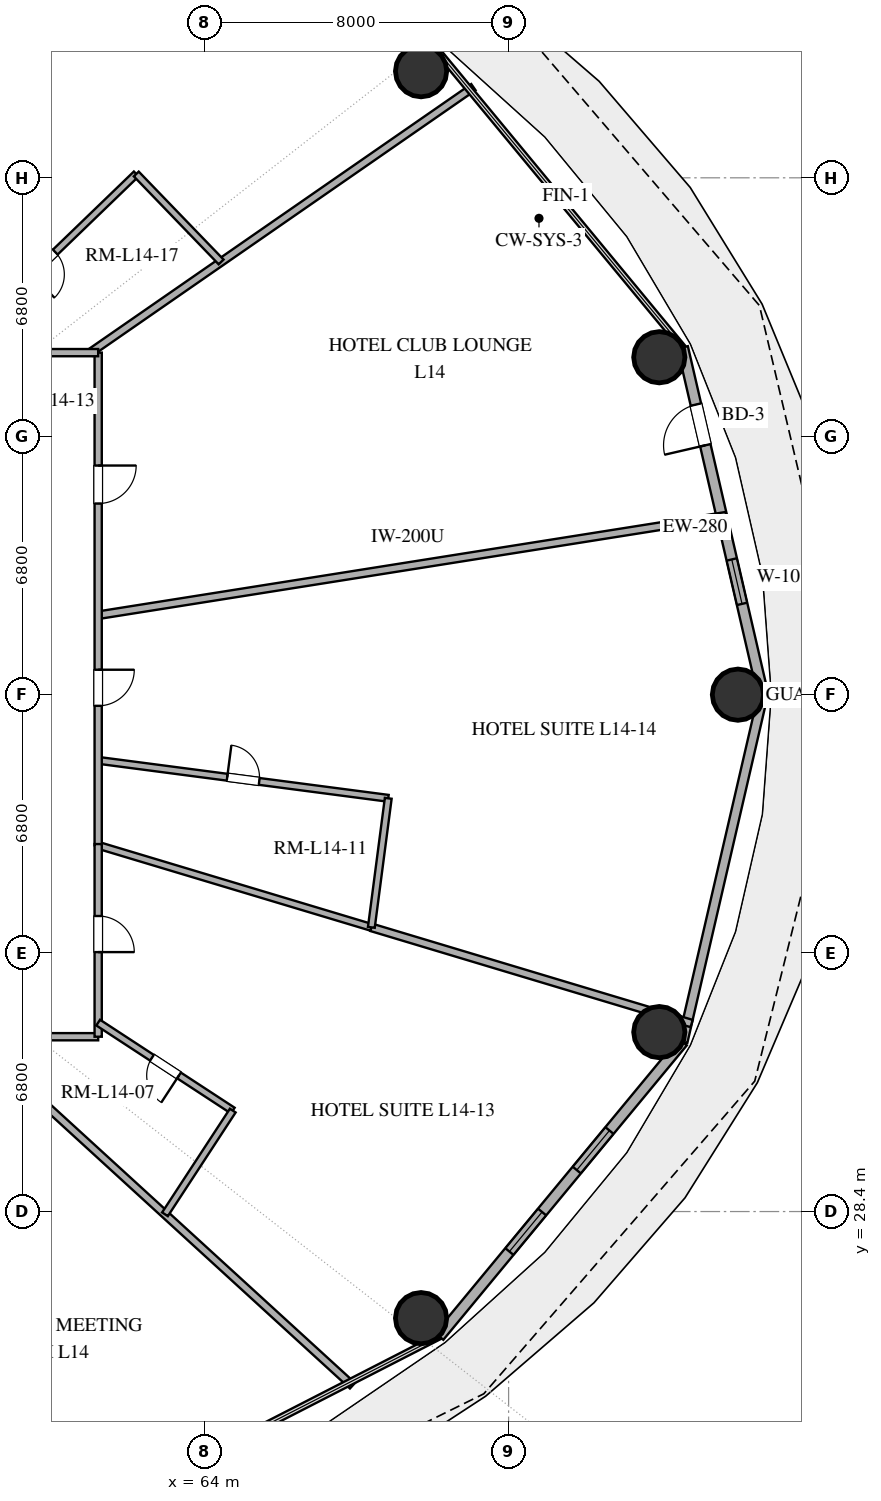
"""IFC4 building model, lengths in metres.
Left out: names, types, materials, properties, quantities, classifications, styles, units other than length and angle.
Written with IfcOpenShell. Run it as: python <this file> out.ifc"""

import sys

from ifc_helpers import new_model, si_unit, direction, frame, frame_2d, origin, origin_2d, place, context, subcontext, project, spatial, rectangle, hollow_circle, extrude, element, fill, save


model = new_model("IFC4")
c1 = context("Model", 3, precision=1e-05, world=origin(), true_north=direction((0.0, 1.0)))
c2 = subcontext(c1, "Body", "Model", "MODEL_VIEW")
j1 = project(units=[si_unit("LENGTHUNIT", "METRE"), si_unit("PLANEANGLEUNIT", "RADIAN")], contexts=[c1])
p1 = place(None, origin())
s1 = spatial("IfcSite", under=j1, at=p1, CompositionType="ELEMENT")
p2 = place(p1, origin())
s2 = spatial("IfcBuilding", under=s1, at=p2, CompositionType="ELEMENT")
p3 = place(p2, frame((0.0, 0.0, 60.6)))
s3 = spatial("IfcBuildingStorey", under=s2, at=p3, CompositionType="ELEMENT", Elevation=60.6)
for number, where, z_axis, x_axis in (
    (1, (78.035, 42.0, 0.0), (0.0, 0.0, 1.0), (1.0, 0.0, 0.0)),
    (2, (75.966, 50.878, 0.0), (0.0, 0.0, 1.0), (1.0, 0.0, 0.0)),
    (3, (69.697, 58.405, 0.0), (0.0, 0.0, 1.0), (1.0, 0.0, 0.0)),
    (4, (69.697, 25.595, 0.0), (0.0, 0.0, 1.0), (1.0, 0.0, 0.0)),
    (5, (75.966, 33.122, 0.0), (0.0, 0.0, 1.0), (1.0, 0.0, 0.0)),
):
    element("IfcColumn", number, at=place(p3, frame(where, z_axis=z_axis, x_axis=x_axis)), inside=s3, PredefinedType="COLUMN", context=c2, shape_type="SweptSolid", body=[
        extrude(hollow_circle(Radius=0.675, WallThickness=0.036, at=origin_2d()), origin(), (0.0, 0.0, 1.0), 3.38),
    ])
p4 = place(p3, frame((78.696, 42.0, 0.0), z_axis=(0.0, 0.0, 1.0), x_axis=(-0.225454452941, 0.974253709076, 0.0)))
e6 = element("IfcWall", 6, at=p4, inside=s3, PredefinedType="SOLIDWALL", context=c2, shape_type="SweptSolid", body=[
    extrude(rectangle(XDim=9.38, YDim=0.28, at=frame_2d((4.69, 0.0))), origin(), (0.0, 0.0, 1.0), 3.38),
])
p5 = place(p4, frame((2.452, 0.0, 0.85)))
e7 = element("IfcOpeningElement", 7, at=p5, cuts=e6, PredefinedType="OPENING", context=c2, shape_type="SweptSolid", body=[
    extrude(rectangle(XDim=1.2, YDim=1.6, at=frame_2d((0.6, 0.8))), frame((0.0, 0.15, 0.0), z_axis=(0.0, -1.0, 0.0), x_axis=(1.0, 0.0, 0.0)), (0.0, 0.0, 1.0), 0.3),
])
p6 = place(p4, frame((6.735, 0.0, 0.0)))
e8 = element("IfcOpeningElement", 8, at=p6, cuts=e6, PredefinedType="OPENING", context=c2, shape_type="SweptSolid", body=[
    extrude(rectangle(XDim=1.1, YDim=2.25, at=frame_2d((0.55, 1.125))), frame((0.0, 0.15, 0.0), z_axis=(0.0, -1.0, 0.0), x_axis=(1.0, 0.0, 0.0)), (0.0, 0.0, 1.0), 0.3),
])
p7 = place(p3, frame((70.174, 58.886, 0.0), z_axis=(0.0, 0.0, 1.0), x_axis=(-0.889853976658, 0.456245438581, 0.0)))
e9 = element("IfcWall", 9, at=p7, inside=s3, PredefinedType="SOLIDWALL", context=c2, shape_type="SweptSolid", body=[
    extrude(rectangle(XDim=11.346, YDim=0.28, at=frame_2d((5.673, 0.0))), origin(), (0.0, 0.0, 1.0), 3.38),
])
p8 = place(p7, frame((3.167, 0.0, 0.85)))
e10 = element("IfcOpeningElement", 10, at=p8, cuts=e9, PredefinedType="OPENING", context=c2, shape_type="SweptSolid", body=[
    extrude(rectangle(XDim=1.8, YDim=2.2, at=frame_2d((0.9, 1.1))), frame((0.0, 0.15, 0.0), z_axis=(0.0, -1.0, 0.0), x_axis=(1.0, 0.0, 0.0)), (0.0, 0.0, 1.0), 0.3),
])
p9 = place(p7, frame((6.529, 0.0, 0.85)))
e11 = element("IfcOpeningElement", 11, at=p9, cuts=e9, PredefinedType="OPENING", context=c2, shape_type="SweptSolid", body=[
    extrude(rectangle(XDim=1.8, YDim=2.2, at=frame_2d((0.9, 1.1))), frame((0.0, 0.15, 0.0), z_axis=(0.0, -1.0, 0.0), x_axis=(1.0, 0.0, 0.0)), (0.0, 0.0, 1.0), 0.3),
])
p10 = place(p3, frame((70.174, 25.114, 0.0), z_axis=(0.0, 0.0, 1.0), x_axis=(0.637296809613, 0.770618437657, 0.0)))
e12 = element("IfcWall", 12, at=p10, inside=s3, PredefinedType="SOLIDWALL", context=c2, shape_type="SweptSolid", body=[
    extrude(rectangle(XDim=10.053, YDim=0.28, at=frame_2d((5.027, 0.0))), origin(), (0.0, 0.0, 1.0), 3.38),
])
p11 = place(p10, frame((2.898, 0.0, 0.85)))
e13 = element("IfcOpeningElement", 13, at=p11, cuts=e12, PredefinedType="OPENING", context=c2, shape_type="SweptSolid", body=[
    extrude(rectangle(XDim=1.35, YDim=1.8, at=frame_2d((0.675, 0.9))), frame((0.0, 0.15, 0.0), z_axis=(0.0, -1.0, 0.0), x_axis=(1.0, 0.0, 0.0)), (0.0, 0.0, 1.0), 0.3),
])
p12 = place(p10, frame((5.68, 0.0, 0.85)))
e14 = element("IfcOpeningElement", 14, at=p12, cuts=e12, PredefinedType="OPENING", context=c2, shape_type="SweptSolid", body=[
    extrude(rectangle(XDim=1.35, YDim=1.8, at=frame_2d((0.675, 0.9))), frame((0.0, 0.15, 0.0), z_axis=(0.0, -1.0, 0.0), x_axis=(1.0, 0.0, 0.0)), (0.0, 0.0, 1.0), 0.3),
])
p13 = place(p3, frame((76.581, 32.862, 0.0), z_axis=(0.0, 0.0, 1.0), x_axis=(0.225454452941, 0.974253709076, 0.0)))
e15 = element("IfcWall", 15, at=p13, inside=s3, PredefinedType="SOLIDWALL", context=c2, shape_type="SweptSolid", body=[
    extrude(rectangle(XDim=9.38, YDim=0.25, at=frame_2d((4.69, 0.0))), origin(), (0.0, 0.0, 1.0), 3.38),
])
p14 = place(p3, frame((61.2, 44.091, 0.0), z_axis=(0.0, 0.0, 1.0), x_axis=(0.987690823911, 0.156418785194, 0.0)))
e16 = element("IfcWall", 16, at=p14, inside=s3, PredefinedType="PARTITIONING", context=c2, shape_type="SweptSolid", body=[
    extrude(rectangle(XDim=16.735, YDim=0.2, at=frame_2d((8.368, 0.0))), origin(), (0.0, 0.0, 1.0), 2.74),
])
p15 = place(p3, frame((76.816, 33.347, 0.0), z_axis=(0.0, 0.0, 1.0), x_axis=(-0.957749889613, 0.287602414708, 0.0)))
e17 = element("IfcWall", 17, at=p15, inside=s3, PredefinedType="PARTITIONING", context=c2, shape_type="SweptSolid", body=[
    extrude(rectangle(XDim=8.8, YDim=0.2, at=frame_2d((4.4, 0.0))), origin(), (0.0, 0.0, 1.0), 2.74),
])
p16 = place(p3, frame((53.107, 51.0, 0.0), z_axis=(0.0, 0.0, 1.0), x_axis=(0.493512300658, 0.869738816599, 0.0)))
e18 = element("IfcWall", 18, at=p16, inside=s3, PredefinedType="PARTITIONING", context=c2, shape_type="SweptSolid", body=[
    extrude(rectangle(XDim=14.938, YDim=0.2, at=frame_2d((7.469, 0.0))), origin(), (0.0, 0.0, 1.0), 2.74),
])
p17 = place(p3, frame((60.991, 51.0, 0.0), z_axis=(0.0, 0.0, 1.0), x_axis=(0.821999402566, 0.569488351226, 0.0)))
e19 = element("IfcWall", 19, at=p17, inside=s3, PredefinedType="PARTITIONING", context=c2, shape_type="SweptSolid", body=[
    extrude(rectangle(XDim=12.266, YDim=0.2, at=frame_2d((6.133, 0.0))), origin(), (0.0, 0.0, 1.0), 2.74),
])
p18 = place(p3, frame((61.2, 40.272, 0.0), z_axis=(0.0, 0.0, 1.0), x_axis=(0.991543548491, -0.129774386708, 0.0)))
e20 = element("IfcWall", 20, at=p18, inside=s3, PredefinedType="PLUMBINGWALL", context=c2, shape_type="SweptSolid", body=[
    extrude(rectangle(XDim=7.698, YDim=0.18, at=frame_2d((3.849, 0.0))), origin(), (0.0, 0.0, 1.0), 2.74),
])
p19 = place(p18, frame((3.424, 0.0, 0.0)))
e21 = element("IfcOpeningElement", 21, at=p19, cuts=e20, PredefinedType="OPENING", context=c2, shape_type="SweptSolid", body=[
    extrude(rectangle(XDim=0.85, YDim=2.1, at=frame_2d((0.425, 1.05))), frame((0.0, 0.1, 0.0), z_axis=(0.0, -1.0, 0.0), x_axis=(1.0, 0.0, 0.0)), (0.0, 0.0, 1.0), 0.2),
])
p20 = place(p3, frame((68.388, 35.878, 0.0), z_axis=(0.0, 0.0, 1.0), x_axis=(-0.95775642604, 0.28758064674, 0.0)))
e22 = element("IfcWall", 22, at=p20, inside=s3, PredefinedType="PLUMBINGWALL", context=c2, shape_type="SweptSolid", body=[
    extrude(rectangle(XDim=7.506, YDim=0.18, at=frame_2d((3.753, 0.0))), origin(), (0.0, 0.0, 1.0), 2.74),
])
p21 = place(p3, frame((57.846, 33.0, 0.0), z_axis=(0.0, 0.0, 1.0), x_axis=(0.738119160364, -0.674670367738, 0.0)))
e23 = element("IfcWall", 23, at=p21, inside=s3, PredefinedType="PARTITIONING", context=c2, shape_type="SweptSolid", body=[
    extrude(rectangle(XDim=13.61, YDim=0.2, at=frame_2d((6.805, 0.0))), origin(), (0.0, 0.0, 1.0), 2.74),
])
p22 = place(p3, frame((61.2, 51.0, 0.0), z_axis=(0.0, 0.0, 1.0), x_axis=(0.0, -1.0, 0.0)))
e24 = element("IfcWall", 24, at=p22, inside=s3, PredefinedType="PARTITIONING", context=c2, shape_type="SweptSolid", body=[
    extrude(rectangle(XDim=12.964, YDim=0.19, at=frame_2d((6.482, 0.0))), origin(), (0.0, 0.0, 1.0), 2.74),
])
p23 = place(p22, frame((2.971, 0.0, 0.0)))
e25 = element("IfcOpeningElement", 25, at=p23, cuts=e24, PredefinedType="OPENING", context=c2, shape_type="SweptSolid", body=[
    extrude(rectangle(XDim=1.0, YDim=2.2, at=frame_2d((0.5, 1.1))), frame((0.0, 0.105, 0.0), z_axis=(0.0, -1.0, 0.0), x_axis=(1.0, 0.0, 0.0)), (0.0, 0.0, 1.0), 0.21),
])
p24 = place(p22, frame((8.344, 0.0, 0.0)))
e26 = element("IfcOpeningElement", 26, at=p24, cuts=e24, PredefinedType="OPENING", context=c2, shape_type="SweptSolid", body=[
    extrude(rectangle(XDim=0.95, YDim=2.15, at=frame_2d((0.475, 1.075))), frame((0.0, 0.105, 0.0), z_axis=(0.0, -1.0, 0.0), x_axis=(1.0, 0.0, 0.0)), (0.0, 0.0, 1.0), 0.21),
])
p25 = place(p3, frame((62.202, 55.701, 0.0), z_axis=(0.0, 0.0, 1.0), x_axis=(-0.719667322044, -0.69431905172, 0.0)))
e27 = element("IfcWall", 27, at=p25, inside=s3, PredefinedType="PLUMBINGWALL", context=c2, shape_type="SweptSolid", body=[
    extrude(rectangle(XDim=6.771, YDim=0.18, at=frame_2d((3.385, 0.0))), origin(), (0.0, 0.0, 1.0), 2.74),
])
p26 = place(p25, frame((2.96, 0.0, 0.0)))
e28 = element("IfcOpeningElement", 28, at=p26, cuts=e27, PredefinedType="OPENING", context=c2, shape_type="SweptSolid", body=[
    extrude(rectangle(XDim=0.85, YDim=2.1, at=frame_2d((0.425, 1.05))), frame((0.0, 0.1, 0.0), z_axis=(0.0, -1.0, 0.0), x_axis=(1.0, 0.0, 0.0)), (0.0, 0.0, 1.0), 0.2),
])
p27 = place(p3, frame((61.2, 33.0, 0.0), z_axis=(0.0, 0.0, 1.0), x_axis=(-1.0, 0.0, 0.0)))
e29 = element("IfcWall", 29, at=p27, inside=s3, PredefinedType="PARTITIONING", context=c2, shape_type="SweptSolid", body=[
    extrude(rectangle(XDim=13.839, YDim=0.19, at=frame_2d((6.919, 0.0))), origin(), (0.0, 0.0, 1.0), 2.74),
])
p28 = place(p27, frame((5.965, 0.0, 0.0)))
e30 = element("IfcOpeningElement", 30, at=p28, cuts=e29, PredefinedType="OPENING", context=c2, shape_type="SweptSolid", body=[
    extrude(rectangle(XDim=1.0, YDim=2.2, at=frame_2d((0.5, 1.1))), frame((0.0, 0.105, 0.0), z_axis=(0.0, -1.0, 0.0), x_axis=(1.0, 0.0, 0.0)), (0.0, 0.0, 1.0), 0.21),
])
p29 = place(p27, frame((10.493, 0.0, 0.0)))
e31 = element("IfcOpeningElement", 31, at=p29, cuts=e29, PredefinedType="OPENING", context=c2, shape_type="SweptSolid", body=[
    extrude(rectangle(XDim=0.95, YDim=2.15, at=frame_2d((0.475, 1.075))), frame((0.0, 0.105, 0.0), z_axis=(0.0, -1.0, 0.0), x_axis=(1.0, 0.0, 0.0)), (0.0, 0.0, 1.0), 0.21),
])
p30 = place(p3, frame((61.2, 38.07, 0.0), z_axis=(0.0, 0.0, 1.0), x_axis=(0.0, -1.0, 0.0)))
e32 = element("IfcWall", 32, at=p30, inside=s3, PredefinedType="PARTITIONING", context=c2, shape_type="SweptSolid", body=[
    extrude(rectangle(XDim=5.07, YDim=0.19, at=frame_2d((2.535, 0.0))), origin(), (0.0, 0.0, 1.0), 2.74),
])
p31 = place(p30, frame((1.893, 0.0, 0.0)))
e33 = element("IfcOpeningElement", 33, at=p31, cuts=e32, PredefinedType="OPENING", context=c2, shape_type="SweptSolid", body=[
    extrude(rectangle(XDim=0.95, YDim=2.15, at=frame_2d((0.475, 1.075))), frame((0.0, 0.105, 0.0), z_axis=(0.0, -1.0, 0.0), x_axis=(1.0, 0.0, 0.0)), (0.0, 0.0, 1.0), 0.21),
])
p32 = place(p3, frame((51.298, 51.0, 0.0), z_axis=(0.0, 0.0, 1.0), x_axis=(1.0, 0.0, 0.0)))
e34 = element("IfcWall", 34, at=p32, inside=s3, PredefinedType="PARTITIONING", context=c2, shape_type="SweptSolid", body=[
    extrude(rectangle(XDim=9.902, YDim=0.19, at=frame_2d((4.951, 0.0))), origin(), (0.0, 0.0, 1.0), 2.74),
])
p33 = place(p32, frame((3.45, 0.0, 0.0)))
e35 = element("IfcOpeningElement", 35, at=p33, cuts=e34, PredefinedType="OPENING", context=c2, shape_type="SweptSolid", body=[
    extrude(rectangle(XDim=0.95, YDim=2.15, at=frame_2d((0.475, 1.075))), frame((0.0, 0.105, 0.0), z_axis=(0.0, -1.0, 0.0), x_axis=(1.0, 0.0, 0.0)), (0.0, 0.0, 1.0), 0.21),
])
p34 = place(p3, frame((64.742, 31.056, 0.0), z_axis=(0.0, 0.0, 1.0), x_axis=(-0.837031612028, 0.5471545307, 0.0)))
e36 = element("IfcWall", 36, at=p34, inside=s3, PredefinedType="PLUMBINGWALL", context=c2, shape_type="SweptSolid", body=[
    extrude(rectangle(XDim=4.231, YDim=0.18, at=frame_2d((2.116, 0.0))), origin(), (0.0, 0.0, 1.0), 2.74),
])
p35 = place(p34, frame((1.691, 0.0, 0.0)))
e37 = element("IfcOpeningElement", 37, at=p35, cuts=e36, PredefinedType="OPENING", context=c2, shape_type="SweptSolid", body=[
    extrude(rectangle(XDim=0.85, YDim=2.1, at=frame_2d((0.425, 1.05))), frame((0.0, 0.1, 0.0), z_axis=(0.0, -1.0, 0.0), x_axis=(1.0, 0.0, 0.0)), (0.0, 0.0, 1.0), 0.2),
])
p36 = place(p3, frame((68.833, 39.273, 0.0), z_axis=(0.0, 0.0, 1.0), x_axis=(-0.129823772588, -0.991537083558, 0.0)))
e38 = element("IfcWall", 38, at=p36, inside=s3, PredefinedType="PLUMBINGWALL", context=c2, shape_type="SweptSolid", body=[
    extrude(rectangle(XDim=3.425, YDim=0.18, at=frame_2d((1.712, 0.0))), origin(), (0.0, 0.0, 1.0), 2.74),
])
p37 = place(p3, frame((62.958, 28.328, 0.0), z_axis=(0.0, 0.0, 1.0), x_axis=(0.547176717469, 0.837017108463, 0.0)))
e39 = element("IfcWall", 39, at=p37, inside=s3, PredefinedType="PLUMBINGWALL", context=c2, shape_type="SweptSolid", body=[
    extrude(rectangle(XDim=3.26, YDim=0.18, at=frame_2d((1.63, 0.0))), origin(), (0.0, 0.0, 1.0), 2.74),
])
p38 = place(p3, frame((64.435, 53.386, 0.0), z_axis=(0.0, 0.0, 1.0), x_axis=(-0.694278833189, 0.719706121821, 0.0)))
e40 = element("IfcWall", 40, at=p38, inside=s3, PredefinedType="PLUMBINGWALL", context=c2, shape_type="SweptSolid", body=[
    extrude(rectangle(XDim=3.217, YDim=0.18, at=frame_2d((1.608, 0.0))), origin(), (0.0, 0.0, 1.0), 2.74),
])
p39 = place(p5, origin())
e41 = element("IfcWindow", 41, at=p39, inside=s3, PartitioningType="SINGLE_PANEL", PredefinedType="WINDOW", context=c2, shape_type="SweptSolid", body=[
    extrude(rectangle(XDim=1.2, YDim=1.6, at=frame_2d((0.6, 0.8))), frame((0.0, 0.03, 0.0), z_axis=(0.0, -1.0, 0.0), x_axis=(1.0, 0.0, 0.0)), (0.0, 0.0, 1.0), 0.06),
])
fill(e7, e41)
p40 = place(p6, origin())
e42 = element("IfcDoor", 42, at=p40, inside=s3, OperationType="SINGLE_SWING_LEFT", PredefinedType="DOOR", context=c2, shape_type="SweptSolid", body=[
    extrude(rectangle(XDim=1.1, YDim=2.25, at=frame_2d((0.55, 1.125))), frame((0.0, 0.025, 0.0), z_axis=(0.0, -1.0, 0.0), x_axis=(1.0, 0.0, 0.0)), (0.0, 0.0, 1.0), 0.05),
])
fill(e8, e42)
p41 = place(p11, origin())
e43 = element("IfcWindow", 43, at=p41, inside=s3, PartitioningType="SINGLE_PANEL", PredefinedType="WINDOW", context=c2, shape_type="SweptSolid", body=[
    extrude(rectangle(XDim=1.35, YDim=1.8, at=frame_2d((0.675, 0.9))), frame((0.0, 0.03, 0.0), z_axis=(0.0, -1.0, 0.0), x_axis=(1.0, 0.0, 0.0)), (0.0, 0.0, 1.0), 0.06),
])
fill(e13, e43)
p42 = place(p12, origin())
e44 = element("IfcWindow", 44, at=p42, inside=s3, PartitioningType="SINGLE_PANEL", PredefinedType="WINDOW", context=c2, shape_type="SweptSolid", body=[
    extrude(rectangle(XDim=1.35, YDim=1.8, at=frame_2d((0.675, 0.9))), frame((0.0, 0.03, 0.0), z_axis=(0.0, -1.0, 0.0), x_axis=(1.0, 0.0, 0.0)), (0.0, 0.0, 1.0), 0.06),
])
fill(e14, e44)
p43 = place(p19, origin())
e45 = element("IfcDoor", 45, at=p43, inside=s3, OperationType="SINGLE_SWING_LEFT", PredefinedType="DOOR", context=c2, shape_type="SweptSolid", body=[
    extrude(rectangle(XDim=0.85, YDim=2.1, at=frame_2d((0.425, 1.05))), frame((0.0, 0.025, 0.0), z_axis=(0.0, -1.0, 0.0), x_axis=(1.0, 0.0, 0.0)), (0.0, 0.0, 1.0), 0.05),
])
fill(e21, e45)
p44 = place(p23, origin())
e46 = element("IfcDoor", 46, at=p44, inside=s3, OperationType="SINGLE_SWING_LEFT", PredefinedType="DOOR", context=c2, shape_type="SweptSolid", body=[
    extrude(rectangle(XDim=1.0, YDim=2.2, at=frame_2d((0.5, 1.1))), frame((0.0, 0.025, 0.0), z_axis=(0.0, -1.0, 0.0), x_axis=(1.0, 0.0, 0.0)), (0.0, 0.0, 1.0), 0.05),
])
fill(e25, e46)
p45 = place(p24, origin())
e47 = element("IfcDoor", 47, at=p45, inside=s3, OperationType="SINGLE_SWING_LEFT", PredefinedType="DOOR", context=c2, shape_type="SweptSolid", body=[
    extrude(rectangle(XDim=0.95, YDim=2.15, at=frame_2d((0.475, 1.075))), frame((0.0, 0.025, 0.0), z_axis=(0.0, -1.0, 0.0), x_axis=(1.0, 0.0, 0.0)), (0.0, 0.0, 1.0), 0.05),
])
fill(e26, e47)
p46 = place(p26, origin())
e48 = element("IfcDoor", 48, at=p46, inside=s3, OperationType="SINGLE_SWING_RIGHT", PredefinedType="DOOR", context=c2, shape_type="SweptSolid", body=[
    extrude(rectangle(XDim=0.85, YDim=2.1, at=frame_2d((0.425, 1.05))), frame((0.0, 0.025, 0.0), z_axis=(0.0, -1.0, 0.0), x_axis=(1.0, 0.0, 0.0)), (0.0, 0.0, 1.0), 0.05),
])
fill(e28, e48)
p47 = place(p31, origin())
e49 = element("IfcDoor", 49, at=p47, inside=s3, OperationType="SINGLE_SWING_RIGHT", PredefinedType="DOOR", context=c2, shape_type="SweptSolid", body=[
    extrude(rectangle(XDim=0.95, YDim=2.15, at=frame_2d((0.475, 1.075))), frame((0.0, 0.025, 0.0), z_axis=(0.0, -1.0, 0.0), x_axis=(1.0, 0.0, 0.0)), (0.0, 0.0, 1.0), 0.05),
])
fill(e33, e49)
p48 = place(p35, origin())
e50 = element("IfcDoor", 50, at=p48, inside=s3, OperationType="SINGLE_SWING_LEFT", PredefinedType="DOOR", context=c2, shape_type="SweptSolid", body=[
    extrude(rectangle(XDim=0.85, YDim=2.1, at=frame_2d((0.425, 1.05))), frame((0.0, 0.025, 0.0), z_axis=(0.0, -1.0, 0.0), x_axis=(1.0, 0.0, 0.0)), (0.0, 0.0, 1.0), 0.05),
])
fill(e37, e50)
save(model, sys.argv[1])
